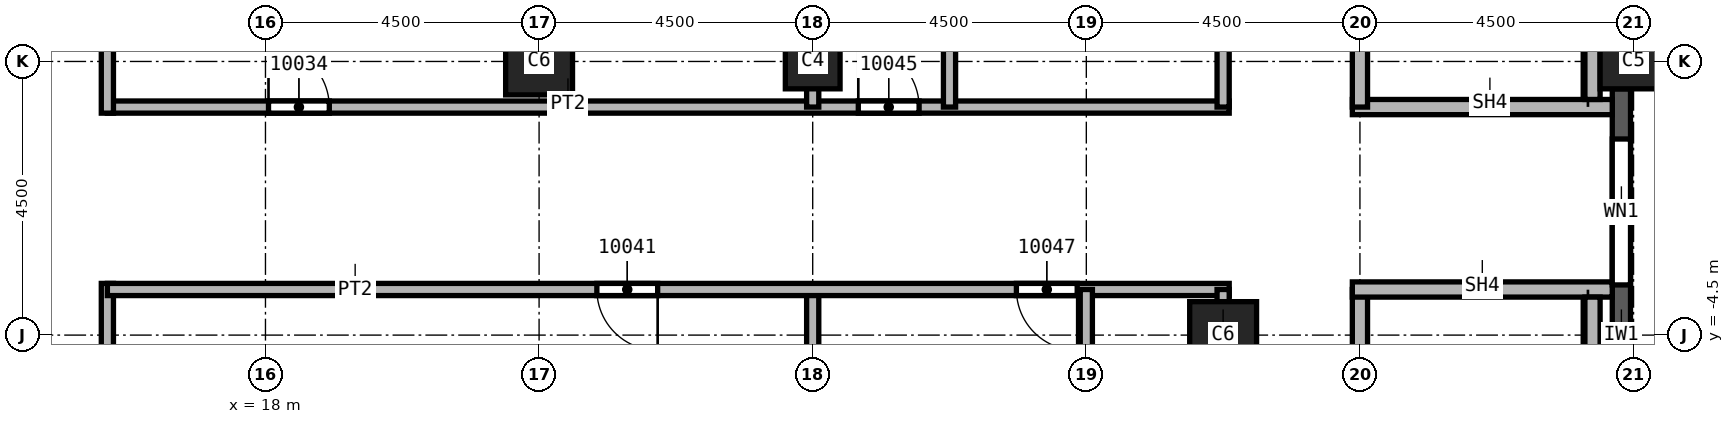
"""IFC4 building model, lengths in metres.
Left out: names, types, materials, properties, quantities, classifications, styles, units other than length and angle.
Written with IfcOpenShell. Run it as: python <this file> out.ifc"""

import sys

from ifc_helpers import new_model, si_unit, direction, frame, frame_2d, origin, origin_2d, place, context, subcontext, project, spatial, rectangle, extrude, element, fill, save


model = new_model("IFC4")
c1 = context("Model", 3, precision=1e-05, world=origin(), true_north=direction((0.0, 1.0)))
c2 = subcontext(c1, "Body", "Model", "MODEL_VIEW")
j1 = project(units=[si_unit("LENGTHUNIT", "METRE"), si_unit("PLANEANGLEUNIT", "RADIAN")], contexts=[c1])
p1 = place(None, origin())
s1 = spatial("IfcSite", under=j1, at=p1, CompositionType="ELEMENT")
p2 = place(p1, origin())
s2 = spatial("IfcBuilding", under=s1, at=p2, CompositionType="ELEMENT")
p3 = place(p2, frame((0.0, 0.0, 170.0)))
s3 = spatial("IfcBuildingStorey", under=s2, at=p3, CompositionType="ELEMENT", Elevation=170.0)
p4 = place(p3, frame((40.5, 0.0, 0.0), z_axis=(0.0, 0.0, 1.0), x_axis=(0.0, 1.0, 0.0)))
e1 = element("IfcColumn", 1, at=p4, inside=s3, PredefinedType="COLUMN", context=c2, shape_type="SweptSolid", body=[
    extrude(rectangle(XDim=0.9, YDim=1.1, at=origin_2d()), origin(), (0.0, 0.0, 1.0), 3.7),
])
for number, where, z_axis, x_axis in (
    (2, (33.75, -4.5, 0.0), (0.0, 0.0, 1.0), (1.0, 0.0, 0.0)),
    (3, (22.5, 0.0, 0.0), (0.0, 0.0, 1.0), (1.0, 0.0, 0.0)),
):
    element("IfcColumn", number, at=place(p3, frame(where, z_axis=z_axis, x_axis=x_axis)), inside=s3, PredefinedType="COLUMN", context=c2, shape_type="SweptSolid", body=[
        extrude(rectangle(XDim=1.1, YDim=1.1, at=origin_2d()), origin(), (0.0, 0.0, 1.0), 3.7),
    ])
p5 = place(p3, frame((27.0, 0.0, 0.0), z_axis=(0.0, 0.0, 1.0), x_axis=(1.0, 0.0, 0.0)))
e4 = element("IfcColumn", 4, at=p5, inside=s3, PredefinedType="COLUMN", context=c2, shape_type="SweptSolid", body=[
    extrude(rectangle(XDim=0.9, YDim=0.9, at=origin_2d()), origin(), (0.0, 0.0, 1.0), 3.7),
])
p6 = place(p3, frame((40.3, -8.55, 0.0), z_axis=(0.0, 0.0, 1.0), x_axis=(0.0, 1.0, 0.0)))
e5 = element("IfcWall", 5, at=p6, inside=s3, PredefinedType="SOLIDWALL", context=c2, shape_type="SweptSolid", body=[
    extrude(rectangle(XDim=8.1, YDim=0.3, at=frame_2d((4.05, 0.0))), origin(), (0.0, 0.0, 1.0), 3.1),
])
p7 = place(p6, frame((0.825, 0.0, 0.8)))
e6 = element("IfcOpeningElement", 6, at=p7, cuts=e5, PredefinedType="OPENING", context=c2, shape_type="SweptSolid", body=[
    extrude(rectangle(XDim=2.4, YDim=1.95, at=frame_2d((1.2, 0.975))), frame((0.0, 0.15, 0.0), z_axis=(0.0, -1.0, 0.0), x_axis=(1.0, 0.0, 0.0)), (0.0, 0.0, 1.0), 0.3),
])
p8 = place(p6, frame((4.875, 0.0, 0.8)))
e7 = element("IfcOpeningElement", 7, at=p8, cuts=e5, PredefinedType="OPENING", context=c2, shape_type="SweptSolid", body=[
    extrude(rectangle(XDim=2.4, YDim=1.95, at=frame_2d((1.2, 0.975))), frame((0.0, 0.15, 0.0), z_axis=(0.0, -1.0, 0.0), x_axis=(1.0, 0.0, 0.0)), (0.0, 0.0, 1.0), 0.3),
])
p9 = place(p3, frame((15.4, -3.65, 0.0), z_axis=(0.0, 0.0, 1.0), x_axis=(0.0, -1.0, 0.0)))
e8 = element("IfcWall", 8, at=p9, inside=s3, PredefinedType="PARTITIONING", context=c2, shape_type="SweptSolid", body=[
    extrude(rectangle(XDim=19.6, YDim=0.2, at=frame_2d((9.8, 0.0))), origin(), (0.0, 0.0, 1.0), 3.7),
])
p10 = place(p9, frame((13.0, 0.0, 0.0)))
e9 = element("IfcOpeningElement", 9, at=p10, cuts=e8, PredefinedType="OPENING", context=c2, shape_type="SweptSolid", body=[
    extrude(rectangle(XDim=1.0, YDim=2.1, at=frame_2d((0.5, 1.05))), frame((0.0, 0.1, 0.0), z_axis=(0.0, -1.0, 0.0), x_axis=(1.0, 0.0, 0.0)), (0.0, 0.0, 1.0), 0.2),
])
p11 = place(p9, frame((4.0, 0.0, 0.0)))
e10 = element("IfcOpeningElement", 10, at=p11, cuts=e8, PredefinedType="OPENING", context=c2, shape_type="SweptSolid", body=[
    extrude(rectangle(XDim=1.0, YDim=2.1, at=frame_2d((0.5, 1.05))), frame((0.0, 0.1, 0.0), z_axis=(0.0, -1.0, 0.0), x_axis=(1.0, 0.0, 0.0)), (0.0, 0.0, 1.0), 0.2),
])
p12 = place(p3, frame((15.4, -0.75, 0.0), z_axis=(0.0, 0.0, 1.0), x_axis=(1.0, 0.0, 0.0)))
e11 = element("IfcWall", 11, at=p12, inside=s3, PredefinedType="PARTITIONING", context=c2, shape_type="SweptSolid", body=[
    extrude(rectangle(XDim=18.45, YDim=0.2, at=frame_2d((9.225, 0.0))), origin(), (0.0, 0.0, 1.0), 3.7),
])
p13 = place(p12, frame((2.65, 0.0, 0.0)))
e12 = element("IfcOpeningElement", 12, at=p13, cuts=e11, PredefinedType="OPENING", context=c2, shape_type="SweptSolid", body=[
    extrude(rectangle(XDim=1.0, YDim=2.1, at=frame_2d((0.5, 1.05))), frame((0.0, 0.1, 0.0), z_axis=(0.0, -1.0, 0.0), x_axis=(1.0, 0.0, 0.0)), (0.0, 0.0, 1.0), 0.2),
])
p14 = place(p12, frame((12.35, 0.0, 0.0)))
e13 = element("IfcOpeningElement", 13, at=p14, cuts=e11, PredefinedType="OPENING", context=c2, shape_type="SweptSolid", body=[
    extrude(rectangle(XDim=1.0, YDim=2.1, at=frame_2d((0.5, 1.05))), frame((0.0, 0.1, 0.0), z_axis=(0.0, -1.0, 0.0), x_axis=(1.0, 0.0, 0.0)), (0.0, 0.0, 1.0), 0.2),
])
p15 = place(p3, frame((15.4, 23.25, 0.0), z_axis=(0.0, 0.0, 1.0), x_axis=(0.0, -1.0, 0.0)))
e14 = element("IfcWall", 14, at=p15, inside=s3, PredefinedType="PARTITIONING", context=c2, shape_type="SweptSolid", body=[
    extrude(rectangle(XDim=24.1, YDim=0.2, at=frame_2d((12.05, 0.0))), origin(), (0.0, 0.0, 1.0), 3.7),
])
p16 = place(p15, frame((13.05, 0.0, 0.0)))
e15 = element("IfcOpeningElement", 15, at=p16, cuts=e14, PredefinedType="OPENING", context=c2, shape_type="SweptSolid", body=[
    extrude(rectangle(XDim=1.0, YDim=2.1, at=frame_2d((0.5, 1.05))), frame((0.0, 0.1, 0.0), z_axis=(0.0, -1.0, 0.0), x_axis=(1.0, 0.0, 0.0)), (0.0, 0.0, 1.0), 0.2),
])
p17 = place(p15, frame((3.1, 0.0, 0.0)))
e16 = element("IfcOpeningElement", 16, at=p17, cuts=e14, PredefinedType="OPENING", context=c2, shape_type="SweptSolid", body=[
    extrude(rectangle(XDim=1.0, YDim=2.1, at=frame_2d((0.5, 1.05))), frame((0.0, 0.1, 0.0), z_axis=(0.0, -1.0, 0.0), x_axis=(1.0, 0.0, 0.0)), (0.0, 0.0, 1.0), 0.2),
])
p18 = place(p3, frame((27.0, -3.75, 0.0), z_axis=(0.0, 0.0, 1.0), x_axis=(0.0, -1.0, 0.0)))
e17 = element("IfcWall", 17, at=p18, inside=s3, PredefinedType="PARTITIONING", context=c2, shape_type="SweptSolid", body=[
    extrude(rectangle(XDim=13.7, YDim=0.2, at=frame_2d((6.85, 0.0))), origin(), (0.0, 0.0, 1.0), 3.7),
])
p19 = place(p3, frame((27.0, 17.45, 0.0), z_axis=(0.0, 0.0, 1.0), x_axis=(0.0, -1.0, 0.0)))
e18 = element("IfcWall", 18, at=p19, inside=s3, PredefinedType="PARTITIONING", context=c2, shape_type="SweptSolid", body=[
    extrude(rectangle(XDim=18.2, YDim=0.2, at=frame_2d((9.1, 0.0))), origin(), (0.0, 0.0, 1.0), 3.7),
])
p20 = place(p3, frame((33.85, -3.75, 0.0), z_axis=(0.0, 0.0, 1.0), x_axis=(-1.0, 0.0, 0.0)))
e19 = element("IfcWall", 19, at=p20, inside=s3, PredefinedType="PARTITIONING", context=c2, shape_type="SweptSolid", body=[
    extrude(rectangle(XDim=18.45, YDim=0.2, at=frame_2d((9.225, 0.0))), origin(), (0.0, 0.0, 1.0), 3.7),
])
p21 = place(p20, frame((9.4, 0.0, 0.0)))
e20 = element("IfcOpeningElement", 20, at=p21, cuts=e19, PredefinedType="OPENING", context=c2, shape_type="SweptSolid", body=[
    extrude(rectangle(XDim=1.0, YDim=2.1, at=frame_2d((0.5, 1.05))), frame((0.0, 0.1, 0.0), z_axis=(0.0, -1.0, 0.0), x_axis=(1.0, 0.0, 0.0)), (0.0, 0.0, 1.0), 0.2),
])
p22 = place(p20, frame((2.5, 0.0, 0.0)))
e21 = element("IfcOpeningElement", 21, at=p22, cuts=e19, PredefinedType="OPENING", context=c2, shape_type="SweptSolid", body=[
    extrude(rectangle(XDim=1.0, YDim=2.1, at=frame_2d((0.5, 1.05))), frame((0.0, 0.1, 0.0), z_axis=(0.0, -1.0, 0.0), x_axis=(1.0, 0.0, 0.0)), (0.0, 0.0, 1.0), 0.2),
])
p23 = place(p3, frame((29.25, 17.65, 0.0), z_axis=(0.0, 0.0, 1.0), x_axis=(0.0, -1.0, 0.0)))
e22 = element("IfcWall", 22, at=p23, inside=s3, PredefinedType="PARTITIONING", context=c2, shape_type="SweptSolid", body=[
    extrude(rectangle(XDim=18.4, YDim=0.2, at=frame_2d((9.2, 0.0))), origin(), (0.0, 0.0, 1.0), 3.7),
])
p24 = place(p3, frame((31.5, -3.75, 0.0), z_axis=(0.0, 0.0, 1.0), x_axis=(0.0, -1.0, 0.0)))
e23 = element("IfcWall", 23, at=p24, inside=s3, PredefinedType="PARTITIONING", context=c2, shape_type="SweptSolid", body=[
    extrude(rectangle(XDim=13.7, YDim=0.2, at=frame_2d((6.85, 0.0))), origin(), (0.0, 0.0, 1.0), 3.7),
])
p25 = place(p3, frame((33.75, -11.25, 0.0), z_axis=(0.0, 0.0, 1.0), x_axis=(0.0, 1.0, 0.0)))
e24 = element("IfcWall", 24, at=p25, inside=s3, PredefinedType="PARTITIONING", context=c2, shape_type="SweptSolid", body=[
    extrude(rectangle(XDim=7.5, YDim=0.2, at=frame_2d((3.75, 0.0))), origin(), (0.0, 0.0, 1.0), 3.7),
])
p26 = place(p25, frame((0.55, 0.0, 0.0)))
e25 = element("IfcOpeningElement", 25, at=p26, cuts=e24, PredefinedType="OPENING", context=c2, shape_type="SweptSolid", body=[
    extrude(rectangle(XDim=1.0, YDim=2.1, at=frame_2d((0.5, 1.05))), frame((0.0, 0.1, 0.0), z_axis=(0.0, -1.0, 0.0), x_axis=(1.0, 0.0, 0.0)), (0.0, 0.0, 1.0), 0.2),
])
p27 = place(p3, frame((33.75, -0.75, 0.0), z_axis=(0.0, 0.0, 1.0), x_axis=(0.0, 1.0, 0.0)))
e26 = element("IfcWall", 26, at=p27, inside=s3, PredefinedType="PARTITIONING", context=c2, shape_type="SweptSolid", body=[
    extrude(rectangle(XDim=7.5, YDim=0.2, at=frame_2d((3.75, 0.0))), origin(), (0.0, 0.0, 1.0), 3.7),
])
p28 = place(p27, frame((2.35, 0.0, 0.0)))
e27 = element("IfcOpeningElement", 27, at=p28, cuts=e26, PredefinedType="OPENING", context=c2, shape_type="SweptSolid", body=[
    extrude(rectangle(XDim=1.0, YDim=2.1, at=frame_2d((0.5, 1.05))), frame((0.0, 0.1, 0.0), z_axis=(0.0, -1.0, 0.0), x_axis=(1.0, 0.0, 0.0)), (0.0, 0.0, 1.0), 0.2),
])
p29 = place(p3, frame((35.875, -0.75, 0.0), z_axis=(0.0, 0.0, 1.0), x_axis=(1.0, 0.0, 0.0)))
e28 = element("IfcWall", 28, at=p29, inside=s3, PredefinedType="SOLIDWALL", context=c2, shape_type="SweptSolid", body=[
    extrude(rectangle(XDim=4.275, YDim=0.25, at=frame_2d((2.137, 0.0))), origin(), (0.0, 0.0, 1.0), 3.7),
])
p30 = place(p3, frame((36.0, -11.375, 0.0), z_axis=(0.0, 0.0, 1.0), x_axis=(0.0, 1.0, 0.0)))
e29 = element("IfcWall", 29, at=p30, inside=s3, PredefinedType="SOLIDWALL", context=c2, shape_type="SweptSolid", body=[
    extrude(rectangle(XDim=7.625, YDim=0.25, at=frame_2d((3.812, 0.0))), origin(), (0.0, 0.0, 1.0), 3.7),
])
p31 = place(p30, frame((0.4, 0.0, 0.0)))
e30 = element("IfcOpeningElement", 30, at=p31, cuts=e29, PredefinedType="OPENING", context=c2, shape_type="SweptSolid", body=[
    extrude(rectangle(XDim=1.2, YDim=2.1, at=frame_2d((0.6, 1.05))), frame((0.0, 0.125, 0.0), z_axis=(0.0, -1.0, 0.0), x_axis=(1.0, 0.0, 0.0)), (0.0, 0.0, 1.0), 0.25),
])
p32 = place(p3, frame((36.0, -0.75, 0.0), z_axis=(0.0, 0.0, 1.0), x_axis=(0.0, 1.0, 0.0)))
e31 = element("IfcWall", 31, at=p32, inside=s3, PredefinedType="SOLIDWALL", context=c2, shape_type="SweptSolid", body=[
    extrude(rectangle(XDim=7.625, YDim=0.25, at=frame_2d((3.812, 0.0))), origin(), (0.0, 0.0, 1.0), 3.7),
])
p33 = place(p32, frame((5.95, 0.0, 0.0)))
e32 = element("IfcOpeningElement", 32, at=p33, cuts=e31, PredefinedType="OPENING", context=c2, shape_type="SweptSolid", body=[
    extrude(rectangle(XDim=1.2, YDim=2.1, at=frame_2d((0.6, 1.05))), frame((0.0, 0.125, 0.0), z_axis=(0.0, -1.0, 0.0), x_axis=(1.0, 0.0, 0.0)), (0.0, 0.0, 1.0), 0.25),
])
p34 = place(p3, frame((40.15, -3.75, 0.0), z_axis=(0.0, 0.0, 1.0), x_axis=(-1.0, 0.0, 0.0)))
e33 = element("IfcWall", 33, at=p34, inside=s3, PredefinedType="SOLIDWALL", context=c2, shape_type="SweptSolid", body=[
    extrude(rectangle(XDim=4.275, YDim=0.25, at=frame_2d((2.137, 0.0))), origin(), (0.0, 0.0, 1.0), 3.7),
])
for number, where, z_axis, x_axis in (
    (34, (39.825, -11.125, 0.0), (0.0, 0.0, 1.0), (0.0, 1.0, 0.0)),
    (35, (39.825, -0.625, 0.0), (0.0, 0.0, 1.0), (0.0, 1.0, 0.0)),
):
    element("IfcWall", number, at=place(p3, frame(where, z_axis=z_axis, x_axis=x_axis)), inside=s3, PredefinedType="SOLIDWALL", context=c2, shape_type="SweptSolid", body=[
        extrude(rectangle(XDim=7.25, YDim=0.25, at=frame_2d((3.625, 0.0))), origin(), (0.0, 0.0, 1.0), 3.7),
    ])
p35 = place(p8, origin())
e36 = element("IfcWindow", 36, at=p35, inside=s3, PartitioningType="SINGLE_PANEL", PredefinedType="WINDOW", context=c2, shape_type="SweptSolid", body=[
    extrude(rectangle(XDim=2.4, YDim=1.95, at=frame_2d((1.2, 0.975))), frame((0.0, 0.03, 0.0), z_axis=(0.0, -1.0, 0.0), x_axis=(1.0, 0.0, 0.0)), (0.0, 0.0, 1.0), 0.06),
])
fill(e7, e36)
p36 = place(p13, origin())
e37 = element("IfcDoor", 37, at=p36, inside=s3, OperationType="SINGLE_SWING_LEFT", PredefinedType="DOOR", context=c2, shape_type="SweptSolid", body=[
    extrude(rectangle(XDim=1.0, YDim=2.1, at=frame_2d((0.5, 1.05))), frame((0.0, 0.025, 0.0), z_axis=(0.0, -1.0, 0.0), x_axis=(1.0, 0.0, 0.0)), (0.0, 0.0, 1.0), 0.05),
])
fill(e12, e37)
p37 = place(p21, origin())
e38 = element("IfcDoor", 38, at=p37, inside=s3, OperationType="SINGLE_SWING_RIGHT", PredefinedType="DOOR", context=c2, shape_type="SweptSolid", body=[
    extrude(rectangle(XDim=1.0, YDim=2.1, at=frame_2d((0.5, 1.05))), frame((0.0, 0.025, 0.0), z_axis=(0.0, -1.0, 0.0), x_axis=(1.0, 0.0, 0.0)), (0.0, 0.0, 1.0), 0.05),
])
fill(e20, e38)
p38 = place(p14, origin())
e39 = element("IfcDoor", 39, at=p38, inside=s3, OperationType="SINGLE_SWING_RIGHT", PredefinedType="DOOR", context=c2, shape_type="SweptSolid", body=[
    extrude(rectangle(XDim=1.0, YDim=2.1, at=frame_2d((0.5, 1.05))), frame((0.0, 0.025, 0.0), z_axis=(0.0, -1.0, 0.0), x_axis=(1.0, 0.0, 0.0)), (0.0, 0.0, 1.0), 0.05),
])
fill(e13, e39)
p39 = place(p22, origin())
e40 = element("IfcDoor", 40, at=p39, inside=s3, OperationType="SINGLE_SWING_RIGHT", PredefinedType="DOOR", context=c2, shape_type="SweptSolid", body=[
    extrude(rectangle(XDim=1.0, YDim=2.1, at=frame_2d((0.5, 1.05))), frame((0.0, 0.025, 0.0), z_axis=(0.0, -1.0, 0.0), x_axis=(1.0, 0.0, 0.0)), (0.0, 0.0, 1.0), 0.05),
])
fill(e21, e40)
save(model, sys.argv[1])
